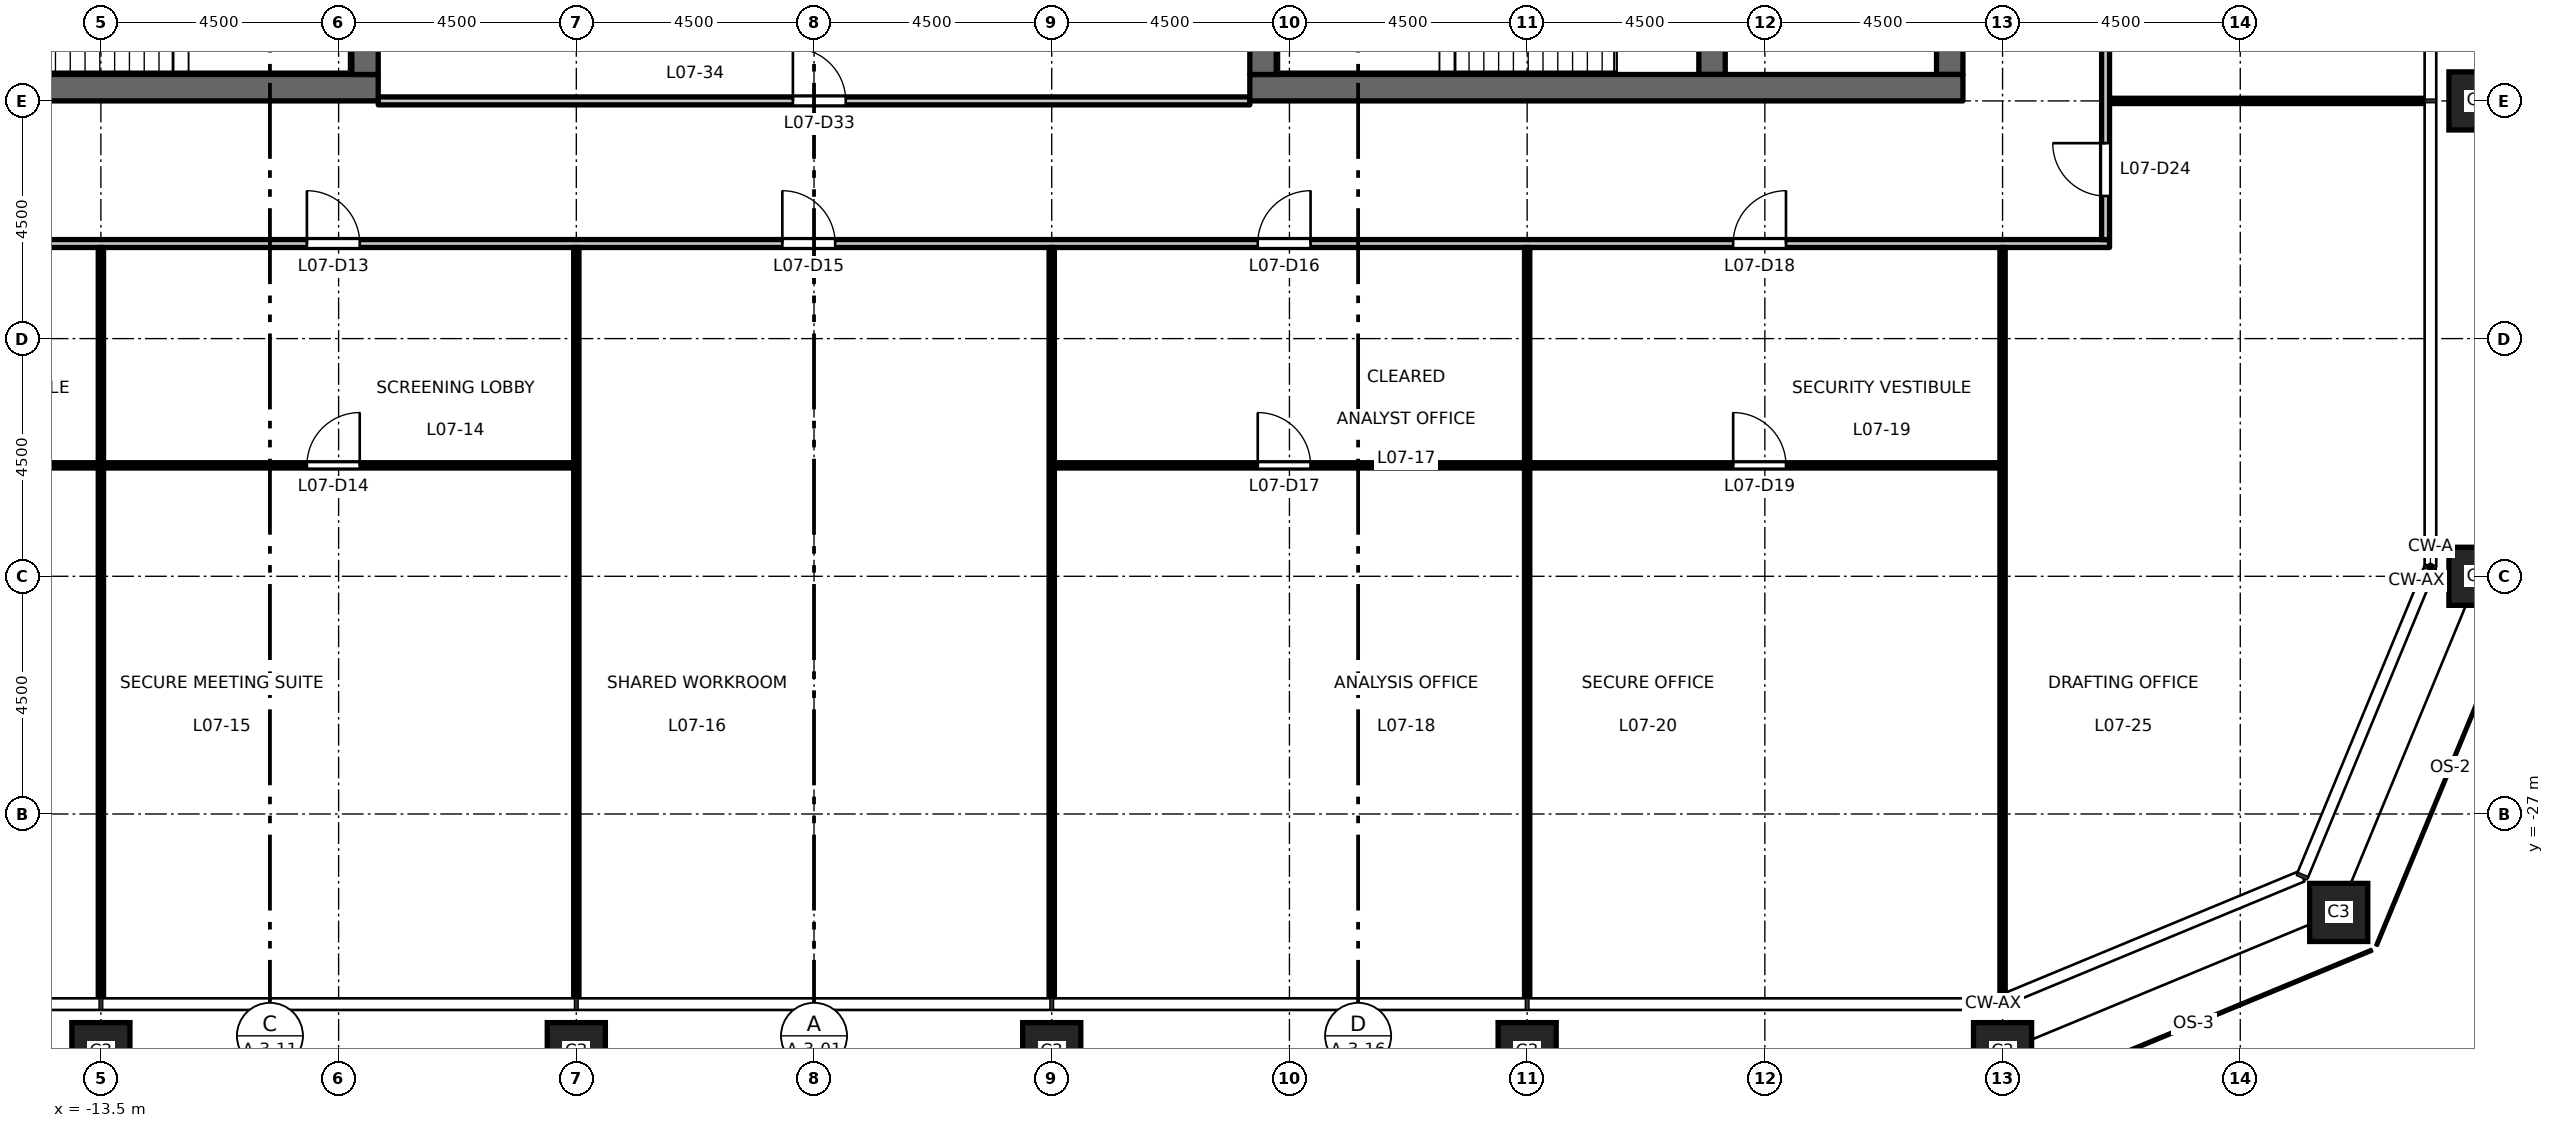
"""IFC4 building model, lengths in metres.
Left out: names, types, materials, properties, quantities, classifications, styles, units other than length and angle.
Written with IfcOpenShell. Run it as: python <this file> out.ifc"""

import sys

from ifc_helpers import new_model, si_unit, direction, frame, frame_2d, origin, origin_2d, place, context, subcontext, project, spatial, rectangle, hollow_rectangle, extrude, element, fill, save


model = new_model("IFC4")
c1 = context("Model", 3, precision=1e-05, world=origin(), true_north=direction((0.0, 1.0)))
c2 = subcontext(c1, "Body", "Model", "MODEL_VIEW")
j1 = project(units=[si_unit("LENGTHUNIT", "METRE"), si_unit("PLANEANGLEUNIT", "RADIAN")], contexts=[c1])
p1 = place(None, origin())
s1 = spatial("IfcSite", under=j1, at=p1, CompositionType="ELEMENT")
p2 = place(p1, origin())
s2 = spatial("IfcBuilding", under=s1, at=p2, CompositionType="ELEMENT")
p3 = place(p2, frame((0.0, 0.0, 35.7)))
s3 = spatial("IfcBuildingStorey", under=s2, at=p3, CompositionType="ELEMENT", Elevation=35.7)
for number, where, z_axis, x_axis in (
    (1, (-13.5, -31.5, 0.0), (0.0, 0.0, 1.0), (1.0, 0.0, 0.0)),
    (2, (-4.5, -31.5, 0.0), (0.0, 0.0, 1.0), (1.0, 0.0, 0.0)),
    (3, (4.5, -31.5, 0.0), (0.0, 0.0, 1.0), (1.0, 0.0, 0.0)),
    (4, (13.5, -31.5, 0.0), (0.0, 0.0, 1.0), (1.0, 0.0, 0.0)),
    (5, (22.5, -31.5, 0.0), (0.0, 0.0, 1.0), (1.0, 0.0, 0.0)),
    (6, (28.864, -28.864, 0.0), (0.0, 0.0, 1.0), (1.0, 0.0, 0.0)),
    (7, (31.5, -22.5, 0.0), (0.0, 0.0, 1.0), (1.0, 0.0, 0.0)),
    (8, (31.5, -13.5, 0.0), (0.0, 0.0, 1.0), (1.0, 0.0, 0.0)),
):
    element("IfcColumn", number, at=place(p3, frame(where, z_axis=z_axis, x_axis=x_axis)), inside=s3, PredefinedType="COLUMN", context=c2, shape_type="SweptSolid", body=[
        extrude(hollow_rectangle(XDim=1.1, YDim=1.1, WallThickness=0.07, at=origin_2d()), origin(), (0.0, 0.0, 1.0), 4.5),
    ])
p4 = place(p3, frame((-8.25, -13.25, 0.0), z_axis=(0.0, 0.0, 1.0), x_axis=(-1.0, 0.0, 0.0)))
e9 = element("IfcWall", 9, at=p4, inside=s3, PredefinedType="SHEAR", context=c2, shape_type="SweptSolid", body=[
    extrude(rectangle(XDim=13.5, YDim=0.5, at=frame_2d((6.75, 0.0))), origin(), (0.0, 0.0, 1.0), 4.35),
])
p5 = place(p3, frame((-8.5, -13.0, 0.0), z_axis=(0.0, 0.0, 1.0), x_axis=(0.0, 1.0, 0.0)))
e10 = element("IfcWall", 10, at=p5, inside=s3, PredefinedType="SHEAR", context=c2, shape_type="SweptSolid", body=[
    extrude(rectangle(XDim=26.0, YDim=0.5, at=frame_2d((13.0, 0.0))), origin(), (0.0, 0.0, 1.0), 4.35),
])
p6 = place(p3, frame((21.5, -13.0, 0.0), z_axis=(0.0, 0.0, 1.0), x_axis=(0.0, 1.0, 0.0)))
e11 = element("IfcWall", 11, at=p6, inside=s3, PredefinedType="SHEAR", context=c2, shape_type="SweptSolid", body=[
    extrude(rectangle(XDim=26.0, YDim=0.5, at=frame_2d((13.0, 0.0))), origin(), (0.0, 0.0, 1.0), 4.35),
])
p7 = place(p6, frame((16.825, 0.0, 0.0)))
e12 = element("IfcOpeningElement", 12, at=p7, cuts=e11, PredefinedType="OPENING", context=c2, shape_type="SweptSolid", body=[
    extrude(rectangle(XDim=1.8, YDim=2.1, at=frame_2d((0.9, 1.05))), frame((0.0, 0.26, 0.0), z_axis=(0.0, -1.0, 0.0), x_axis=(1.0, 0.0, 0.0)), (0.0, 0.0, 1.0), 0.52),
])
p8 = place(p6, frame((7.375, 0.0, 0.0)))
e13 = element("IfcOpeningElement", 13, at=p8, cuts=e11, PredefinedType="OPENING", context=c2, shape_type="SweptSolid", body=[
    extrude(rectangle(XDim=1.8, YDim=2.1, at=frame_2d((0.9, 1.05))), frame((0.0, 0.26, 0.0), z_axis=(0.0, -1.0, 0.0), x_axis=(1.0, 0.0, 0.0)), (0.0, 0.0, 1.0), 0.52),
])
p9 = place(p6, frame((23.4, 0.0, 0.0)))
e14 = element("IfcOpeningElement", 14, at=p9, cuts=e11, PredefinedType="OPENING", context=c2, shape_type="SweptSolid", body=[
    extrude(rectangle(XDim=0.9, YDim=2.1, at=frame_2d((0.45, 1.05))), frame((0.0, 0.26, 0.0), z_axis=(0.0, -1.0, 0.0), x_axis=(1.0, 0.0, 0.0)), (0.0, 0.0, 1.0), 0.52),
])
p10 = place(p3, frame((17.0, -13.0, 0.0), z_axis=(0.0, 0.0, 1.0), x_axis=(0.0, 1.0, 0.0)))
e15 = element("IfcWall", 15, at=p10, inside=s3, PredefinedType="SHEAR", context=c2, shape_type="SweptSolid", body=[
    extrude(rectangle(XDim=6.575, YDim=0.5, at=frame_2d((3.288, 0.0))), origin(), (0.0, 0.0, 1.0), 4.35),
])
p11 = place(p3, frame((8.25, -13.25, 0.0), z_axis=(0.0, 0.0, 1.0), x_axis=(1.0, 0.0, 0.0)))
e16 = element("IfcWall", 16, at=p11, inside=s3, PredefinedType="SHEAR", context=c2, shape_type="SweptSolid", body=[
    extrude(rectangle(XDim=13.5, YDim=0.5, at=frame_2d((6.75, 0.0))), origin(), (0.0, 0.0, 1.0), 4.35),
])
p12 = place(p3, frame((8.5, -13.0, 0.0), z_axis=(0.0, 0.0, 1.0), x_axis=(0.0, 1.0, 0.0)))
e17 = element("IfcWall", 17, at=p12, inside=s3, PredefinedType="SHEAR", context=c2, shape_type="SweptSolid", body=[
    extrude(rectangle(XDim=26.0, YDim=0.5, at=frame_2d((13.0, 0.0))), origin(), (0.0, 0.0, 1.0), 4.35),
])
p13 = place(p3, frame((-22.45, -20.4, 0.0), z_axis=(0.0, 0.0, 1.0), x_axis=(1.0, 0.0, 0.0)))
e18 = element("IfcWall", 18, at=p13, inside=s3, PredefinedType="PARTITIONING", context=c2, shape_type="SweptSolid", body=[
    extrude(rectangle(XDim=17.9, YDim=0.1, at=frame_2d((8.95, 0.0))), origin(), (0.0, 0.0, 1.0), 4.35),
])
p14 = place(p13, frame((3.85, 0.0, 0.0)))
e19 = element("IfcOpeningElement", 19, at=p14, cuts=e18, PredefinedType="OPENING", context=c2, shape_type="SweptSolid", body=[
    extrude(rectangle(XDim=1.0, YDim=2.1, at=frame_2d((0.5, 1.05))), frame((0.0, 0.06, 0.0), z_axis=(0.0, -1.0, 0.0), x_axis=(1.0, 0.0, 0.0)), (0.0, 0.0, 1.0), 0.12),
])
p15 = place(p13, frame((12.85, 0.0, 0.0)))
e20 = element("IfcOpeningElement", 20, at=p15, cuts=e18, PredefinedType="OPENING", context=c2, shape_type="SweptSolid", body=[
    extrude(rectangle(XDim=1.0, YDim=2.1, at=frame_2d((0.5, 1.05))), frame((0.0, 0.06, 0.0), z_axis=(0.0, -1.0, 0.0), x_axis=(1.0, 0.0, 0.0)), (0.0, 0.0, 1.0), 0.12),
])
p16 = place(p3, frame((4.55, -20.4, 0.0), z_axis=(0.0, 0.0, 1.0), x_axis=(1.0, 0.0, 0.0)))
e21 = element("IfcWall", 21, at=p16, inside=s3, PredefinedType="PARTITIONING", context=c2, shape_type="SweptSolid", body=[
    extrude(rectangle(XDim=17.9, YDim=0.1, at=frame_2d((8.95, 0.0))), origin(), (0.0, 0.0, 1.0), 4.35),
])
p17 = place(p16, frame((3.85, 0.0, 0.0)))
e22 = element("IfcOpeningElement", 22, at=p17, cuts=e21, PredefinedType="OPENING", context=c2, shape_type="SweptSolid", body=[
    extrude(rectangle(XDim=1.0, YDim=2.1, at=frame_2d((0.5, 1.05))), frame((0.0, 0.06, 0.0), z_axis=(0.0, -1.0, 0.0), x_axis=(1.0, 0.0, 0.0)), (0.0, 0.0, 1.0), 0.12),
])
p18 = place(p16, frame((12.85, 0.0, 0.0)))
e23 = element("IfcOpeningElement", 23, at=p18, cuts=e21, PredefinedType="OPENING", context=c2, shape_type="SweptSolid", body=[
    extrude(rectangle(XDim=1.0, YDim=2.1, at=frame_2d((0.5, 1.05))), frame((0.0, 0.06, 0.0), z_axis=(0.0, -1.0, 0.0), x_axis=(1.0, 0.0, 0.0)), (0.0, 0.0, 1.0), 0.12),
])
p19 = place(p3, frame((-24.525, -16.2, 0.0), z_axis=(0.0, 0.0, 1.0), x_axis=(1.0, 0.0, 0.0)))
e24 = element("IfcWall", 24, at=p19, inside=s3, PredefinedType="PARTITIONING", context=c2, shape_type="SweptSolid", body=[
    extrude(rectangle(XDim=49.05, YDim=0.15, at=frame_2d((24.525, 0.0))), origin(), (0.0, 0.0, 1.0), 4.35),
])
p20 = place(p19, frame((5.925, 0.0, 0.0)))
e25 = element("IfcOpeningElement", 25, at=p20, cuts=e24, PredefinedType="OPENING", context=c2, shape_type="SweptSolid", body=[
    extrude(rectangle(XDim=1.0, YDim=2.1, at=frame_2d((0.5, 1.05))), frame((0.0, 0.085, 0.0), z_axis=(0.0, -1.0, 0.0), x_axis=(1.0, 0.0, 0.0)), (0.0, 0.0, 1.0), 0.17),
])
p21 = place(p19, frame((14.925, 0.0, 0.0)))
e26 = element("IfcOpeningElement", 26, at=p21, cuts=e24, PredefinedType="OPENING", context=c2, shape_type="SweptSolid", body=[
    extrude(rectangle(XDim=1.0, YDim=2.1, at=frame_2d((0.5, 1.05))), frame((0.0, 0.085, 0.0), z_axis=(0.0, -1.0, 0.0), x_axis=(1.0, 0.0, 0.0)), (0.0, 0.0, 1.0), 0.17),
])
p22 = place(p19, frame((23.925, 0.0, 0.0)))
e27 = element("IfcOpeningElement", 27, at=p22, cuts=e24, PredefinedType="OPENING", context=c2, shape_type="SweptSolid", body=[
    extrude(rectangle(XDim=1.0, YDim=2.1, at=frame_2d((0.5, 1.05))), frame((0.0, 0.085, 0.0), z_axis=(0.0, -1.0, 0.0), x_axis=(1.0, 0.0, 0.0)), (0.0, 0.0, 1.0), 0.17),
])
p23 = place(p19, frame((32.925, 0.0, 0.0)))
e28 = element("IfcOpeningElement", 28, at=p23, cuts=e24, PredefinedType="OPENING", context=c2, shape_type="SweptSolid", body=[
    extrude(rectangle(XDim=1.0, YDim=2.1, at=frame_2d((0.5, 1.05))), frame((0.0, 0.085, 0.0), z_axis=(0.0, -1.0, 0.0), x_axis=(1.0, 0.0, 0.0)), (0.0, 0.0, 1.0), 0.17),
])
p24 = place(p19, frame((41.925, 0.0, 0.0)))
e29 = element("IfcOpeningElement", 29, at=p24, cuts=e24, PredefinedType="OPENING", context=c2, shape_type="SweptSolid", body=[
    extrude(rectangle(XDim=1.0, YDim=2.1, at=frame_2d((0.5, 1.05))), frame((0.0, 0.085, 0.0), z_axis=(0.0, -1.0, 0.0), x_axis=(1.0, 0.0, 0.0)), (0.0, 0.0, 1.0), 0.17),
])
p25 = place(p3, frame((24.525, -13.5, 0.0), z_axis=(0.0, 0.0, 1.0), x_axis=(1.0, 0.0, 0.0)))
e30 = element("IfcWall", 30, at=p25, inside=s3, PredefinedType="PARTITIONING", context=c2, shape_type="SweptSolid", body=[
    extrude(rectangle(XDim=5.985, YDim=0.1, at=frame_2d((2.993, 0.0))), origin(), (0.0, 0.0, 1.0), 3.35),
])
p26 = place(p3, frame((-8.25, -13.5, 0.0), z_axis=(0.0, 0.0, 1.0), x_axis=(1.0, 0.0, 0.0)))
e31 = element("IfcWall", 31, at=p26, inside=s3, PredefinedType="PARTITIONING", context=c2, shape_type="SweptSolid", body=[
    extrude(rectangle(XDim=16.5, YDim=0.15, at=frame_2d((8.25, 0.0))), origin(), (0.0, 0.0, 1.0), 3.85),
])
p27 = place(p26, frame((7.85, 0.0, 0.0)))
e32 = element("IfcOpeningElement", 32, at=p27, cuts=e31, PredefinedType="OPENING", context=c2, shape_type="SweptSolid", body=[
    extrude(rectangle(XDim=1.0, YDim=2.1, at=frame_2d((0.5, 1.05))), frame((0.0, 0.085, 0.0), z_axis=(0.0, -1.0, 0.0), x_axis=(1.0, 0.0, 0.0)), (0.0, 0.0, 1.0), 0.17),
])
p28 = place(p3, frame((-13.5, -30.51, 0.0), z_axis=(0.0, 0.0, 1.0), x_axis=(0.0, 1.0, 0.0)))
e33 = element("IfcWall", 33, at=p28, inside=s3, PredefinedType="PARTITIONING", context=c2, shape_type="SweptSolid", body=[
    extrude(rectangle(XDim=10.06, YDim=0.1, at=frame_2d((5.03, 0.0))), origin(), (0.0, 0.0, 1.0), 3.35),
])
p29 = place(p3, frame((-13.5, -20.35, 0.0), z_axis=(0.0, 0.0, 1.0), x_axis=(0.0, 1.0, 0.0)))
e34 = element("IfcWall", 34, at=p29, inside=s3, PredefinedType="PARTITIONING", context=c2, shape_type="SweptSolid", body=[
    extrude(rectangle(XDim=4.075, YDim=0.1, at=frame_2d((2.038, 0.0))), origin(), (0.0, 0.0, 1.0), 3.35),
])
for number, where, z_axis, x_axis in (
    (35, (-4.5, -30.51, 0.0), (0.0, 0.0, 1.0), (0.0, 1.0, 0.0)),
    (36, (4.5, -30.51, 0.0), (0.0, 0.0, 1.0), (0.0, 1.0, 0.0)),
):
    element("IfcWall", number, at=place(p3, frame(where, z_axis=z_axis, x_axis=x_axis)), inside=s3, PredefinedType="PARTITIONING", context=c2, shape_type="SweptSolid", body=[
        extrude(rectangle(XDim=14.235, YDim=0.1, at=frame_2d((7.118, 0.0))), origin(), (0.0, 0.0, 1.0), 3.35),
    ])
p30 = place(p3, frame((13.5, -30.51, 0.0), z_axis=(0.0, 0.0, 1.0), x_axis=(0.0, 1.0, 0.0)))
e37 = element("IfcWall", 37, at=p30, inside=s3, PredefinedType="PARTITIONING", context=c2, shape_type="SweptSolid", body=[
    extrude(rectangle(XDim=10.06, YDim=0.1, at=frame_2d((5.03, 0.0))), origin(), (0.0, 0.0, 1.0), 3.35),
])
p31 = place(p3, frame((13.5, -20.35, 0.0), z_axis=(0.0, 0.0, 1.0), x_axis=(0.0, 1.0, 0.0)))
e38 = element("IfcWall", 38, at=p31, inside=s3, PredefinedType="PARTITIONING", context=c2, shape_type="SweptSolid", body=[
    extrude(rectangle(XDim=4.075, YDim=0.1, at=frame_2d((2.038, 0.0))), origin(), (0.0, 0.0, 1.0), 3.35),
])
p32 = place(p3, frame((22.5, -30.428, 0.0), z_axis=(0.0, 0.0, 1.0), x_axis=(0.0, 1.0, 0.0)))
e39 = element("IfcWall", 39, at=p32, inside=s3, PredefinedType="PARTITIONING", context=c2, shape_type="SweptSolid", body=[
    extrude(rectangle(XDim=14.153, YDim=0.1, at=frame_2d((7.077, 0.0))), origin(), (0.0, 0.0, 1.0), 3.35),
])
p33 = place(p3, frame((24.45, -16.125, 0.0), z_axis=(0.0, 0.0, 1.0), x_axis=(0.0, 1.0, 0.0)))
e40 = element("IfcWall", 40, at=p33, inside=s3, PredefinedType="PARTITIONING", context=c2, shape_type="SweptSolid", body=[
    extrude(rectangle(XDim=32.25, YDim=0.15, at=frame_2d((16.125, 0.0))), origin(), (0.0, 0.0, 1.0), 4.35),
])
p34 = place(p33, frame((30.525, 0.0, 0.0)))
e41 = element("IfcOpeningElement", 41, at=p34, cuts=e40, PredefinedType="OPENING", context=c2, shape_type="SweptSolid", body=[
    extrude(rectangle(XDim=1.0, YDim=2.1, at=frame_2d((0.5, 1.05))), frame((0.0, 0.085, 0.0), z_axis=(0.0, -1.0, 0.0), x_axis=(1.0, 0.0, 0.0)), (0.0, 0.0, 1.0), 0.17),
])
p35 = place(p33, frame((0.825, 0.0, 0.0)))
e42 = element("IfcOpeningElement", 42, at=p35, cuts=e40, PredefinedType="OPENING", context=c2, shape_type="SweptSolid", body=[
    extrude(rectangle(XDim=1.0, YDim=2.1, at=frame_2d((0.5, 1.05))), frame((0.0, 0.085, 0.0), z_axis=(0.0, -1.0, 0.0), x_axis=(1.0, 0.0, 0.0)), (0.0, 0.0, 1.0), 0.17),
])
p36 = place(p33, frame((6.525, 0.0, 0.0)))
e43 = element("IfcOpeningElement", 43, at=p36, cuts=e40, PredefinedType="OPENING", context=c2, shape_type="SweptSolid", body=[
    extrude(rectangle(XDim=1.0, YDim=2.1, at=frame_2d((0.5, 1.05))), frame((0.0, 0.085, 0.0), z_axis=(0.0, -1.0, 0.0), x_axis=(1.0, 0.0, 0.0)), (0.0, 0.0, 1.0), 0.17),
])
p37 = place(p33, frame((15.525, 0.0, 0.0)))
e44 = element("IfcOpeningElement", 44, at=p37, cuts=e40, PredefinedType="OPENING", context=c2, shape_type="SweptSolid", body=[
    extrude(rectangle(XDim=1.0, YDim=2.1, at=frame_2d((0.5, 1.05))), frame((0.0, 0.085, 0.0), z_axis=(0.0, -1.0, 0.0), x_axis=(1.0, 0.0, 0.0)), (0.0, 0.0, 1.0), 0.17),
])
p38 = place(p33, frame((24.525, 0.0, 0.0)))
e45 = element("IfcOpeningElement", 45, at=p38, cuts=e40, PredefinedType="OPENING", context=c2, shape_type="SweptSolid", body=[
    extrude(rectangle(XDim=1.0, YDim=2.1, at=frame_2d((0.5, 1.05))), frame((0.0, 0.085, 0.0), z_axis=(0.0, -1.0, 0.0), x_axis=(1.0, 0.0, 0.0)), (0.0, 0.0, 1.0), 0.17),
])
p39 = place(p21, origin())
e46 = element("IfcDoor", 46, at=p39, inside=s3, OperationType="SINGLE_SWING_LEFT", PredefinedType="DOOR", context=c2, shape_type="SweptSolid", body=[
    extrude(rectangle(XDim=1.0, YDim=2.1, at=frame_2d((0.5, 1.05))), frame((0.0, 0.025, 0.0), z_axis=(0.0, -1.0, 0.0), x_axis=(1.0, 0.0, 0.0)), (0.0, 0.0, 1.0), 0.05),
])
fill(e26, e46)
p40 = place(p15, origin())
e47 = element("IfcDoor", 47, at=p40, inside=s3, OperationType="SINGLE_SWING_RIGHT", PredefinedType="DOOR", context=c2, shape_type="SweptSolid", body=[
    extrude(rectangle(XDim=1.0, YDim=2.1, at=frame_2d((0.5, 1.05))), frame((0.0, 0.025, 0.0), z_axis=(0.0, -1.0, 0.0), x_axis=(1.0, 0.0, 0.0)), (0.0, 0.0, 1.0), 0.05),
])
fill(e20, e47)
p41 = place(p22, origin())
e48 = element("IfcDoor", 48, at=p41, inside=s3, OperationType="SINGLE_SWING_LEFT", PredefinedType="DOOR", context=c2, shape_type="SweptSolid", body=[
    extrude(rectangle(XDim=1.0, YDim=2.1, at=frame_2d((0.5, 1.05))), frame((0.0, 0.025, 0.0), z_axis=(0.0, -1.0, 0.0), x_axis=(1.0, 0.0, 0.0)), (0.0, 0.0, 1.0), 0.05),
])
fill(e27, e48)
p42 = place(p23, origin())
e49 = element("IfcDoor", 49, at=p42, inside=s3, OperationType="SINGLE_SWING_RIGHT", PredefinedType="DOOR", context=c2, shape_type="SweptSolid", body=[
    extrude(rectangle(XDim=1.0, YDim=2.1, at=frame_2d((0.5, 1.05))), frame((0.0, 0.025, 0.0), z_axis=(0.0, -1.0, 0.0), x_axis=(1.0, 0.0, 0.0)), (0.0, 0.0, 1.0), 0.05),
])
fill(e28, e49)
p43 = place(p17, origin())
e50 = element("IfcDoor", 50, at=p43, inside=s3, OperationType="SINGLE_SWING_LEFT", PredefinedType="DOOR", context=c2, shape_type="SweptSolid", body=[
    extrude(rectangle(XDim=1.0, YDim=2.1, at=frame_2d((0.5, 1.05))), frame((0.0, 0.025, 0.0), z_axis=(0.0, -1.0, 0.0), x_axis=(1.0, 0.0, 0.0)), (0.0, 0.0, 1.0), 0.05),
])
fill(e22, e50)
p44 = place(p24, origin())
e51 = element("IfcDoor", 51, at=p44, inside=s3, OperationType="SINGLE_SWING_RIGHT", PredefinedType="DOOR", context=c2, shape_type="SweptSolid", body=[
    extrude(rectangle(XDim=1.0, YDim=2.1, at=frame_2d((0.5, 1.05))), frame((0.0, 0.025, 0.0), z_axis=(0.0, -1.0, 0.0), x_axis=(1.0, 0.0, 0.0)), (0.0, 0.0, 1.0), 0.05),
])
fill(e29, e51)
p45 = place(p18, origin())
e52 = element("IfcDoor", 52, at=p45, inside=s3, OperationType="SINGLE_SWING_LEFT", PredefinedType="DOOR", context=c2, shape_type="SweptSolid", body=[
    extrude(rectangle(XDim=1.0, YDim=2.1, at=frame_2d((0.5, 1.05))), frame((0.0, 0.025, 0.0), z_axis=(0.0, -1.0, 0.0), x_axis=(1.0, 0.0, 0.0)), (0.0, 0.0, 1.0), 0.05),
])
fill(e23, e52)
p46 = place(p35, origin())
e53 = element("IfcDoor", 53, at=p46, inside=s3, OperationType="SINGLE_SWING_RIGHT", PredefinedType="DOOR", context=c2, shape_type="SweptSolid", body=[
    extrude(rectangle(XDim=1.0, YDim=2.1, at=frame_2d((0.5, 1.05))), frame((0.0, 0.025, 0.0), z_axis=(0.0, -1.0, 0.0), x_axis=(1.0, 0.0, 0.0)), (0.0, 0.0, 1.0), 0.05),
])
fill(e42, e53)
p47 = place(p27, origin())
e54 = element("IfcDoor", 54, at=p47, inside=s3, OperationType="SINGLE_SWING_LEFT", PredefinedType="DOOR", context=c2, shape_type="SweptSolid", body=[
    extrude(rectangle(XDim=1.0, YDim=2.1, at=frame_2d((0.5, 1.05))), frame((0.0, 0.025, 0.0), z_axis=(0.0, -1.0, 0.0), x_axis=(1.0, 0.0, 0.0)), (0.0, 0.0, 1.0), 0.05),
])
fill(e32, e54)
save(model, sys.argv[1])
